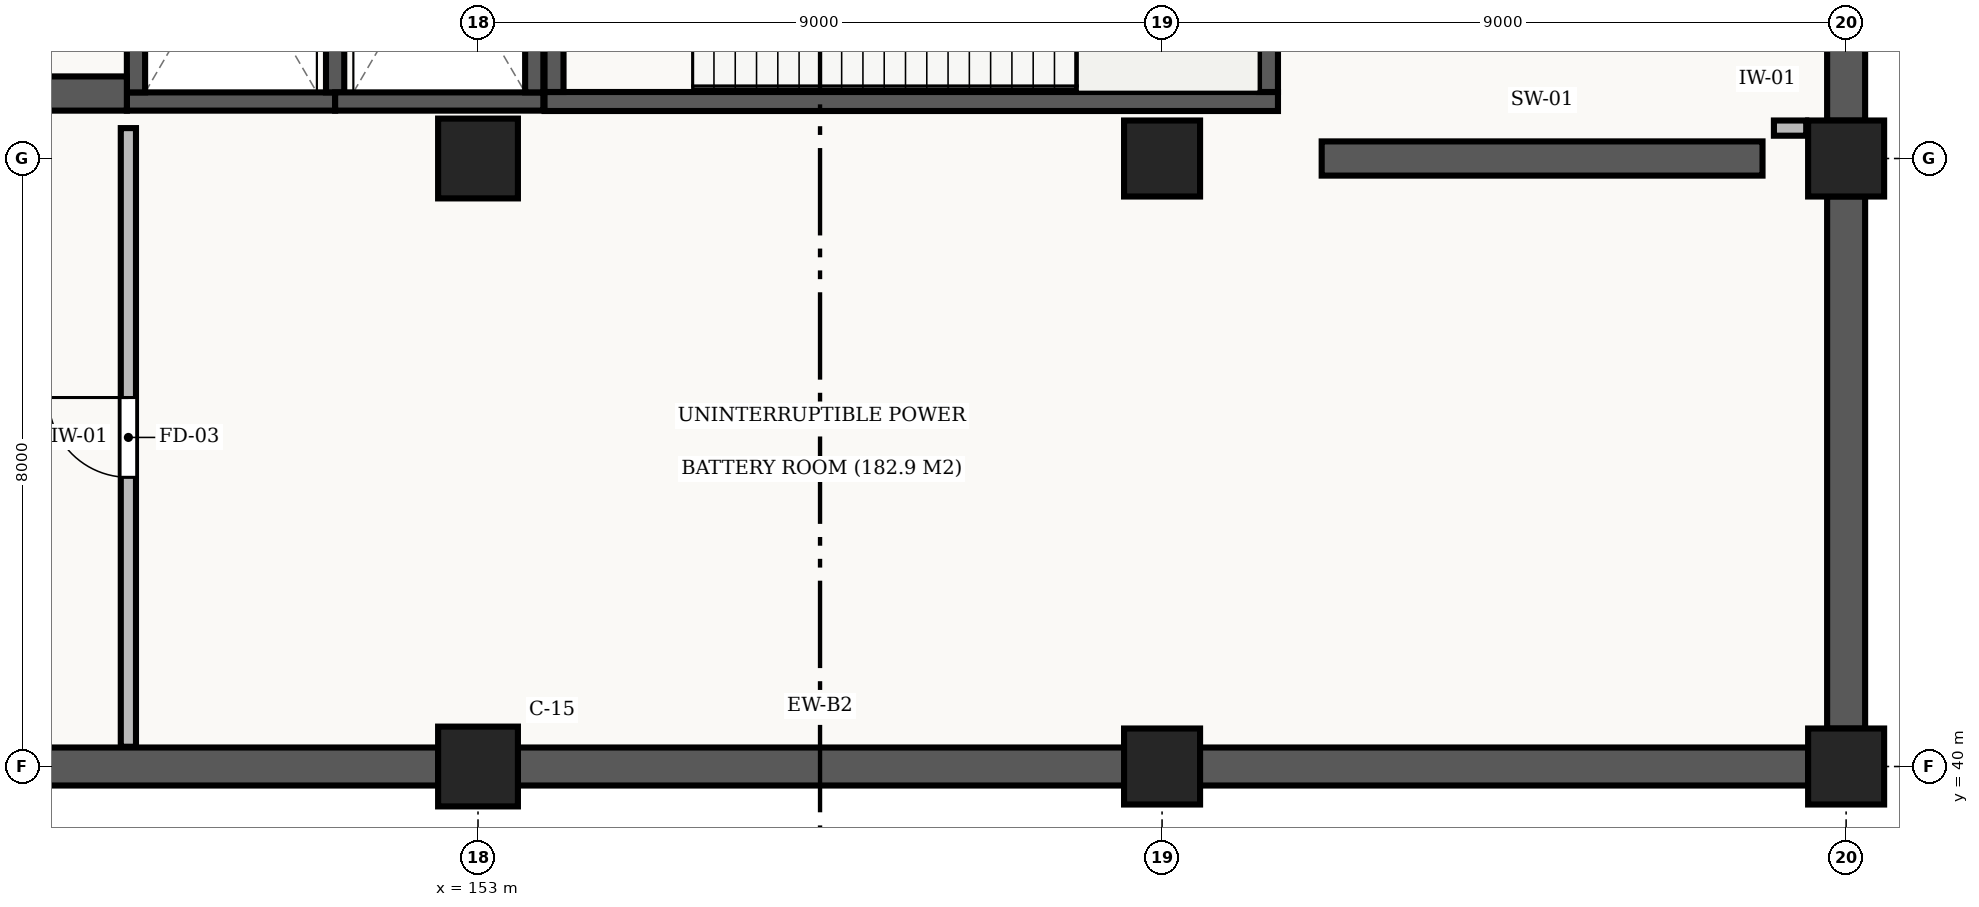
"""IFC4 building model, lengths in metres.
Left out: names, types, materials, properties, quantities, classifications, styles, units other than length and angle.
Written with IfcOpenShell. Run it as: python <this file> out.ifc"""

import sys

from ifc_helpers import new_model, si_unit, direction, frame, frame_2d, origin, origin_2d, place, context, subcontext, project, spatial, rectangle, extrude, element, fill, save


model = new_model("IFC4")
c1 = context("Model", 3, precision=1e-05, world=origin(), true_north=direction((0.0, 1.0)))
c2 = subcontext(c1, "Body", "Model", "MODEL_VIEW")
j1 = project(units=[si_unit("LENGTHUNIT", "METRE"), si_unit("PLANEANGLEUNIT", "RADIAN")], contexts=[c1])
p1 = place(None, origin())
s1 = spatial("IfcSite", under=j1, at=p1, CompositionType="ELEMENT")
p2 = place(p1, origin())
s2 = spatial("IfcBuilding", under=s1, at=p2, CompositionType="ELEMENT")
p3 = place(p2, frame((0.0, 0.0, -6.0)))
s3 = spatial("IfcBuildingStorey", under=s2, at=p3, CompositionType="ELEMENT", Elevation=-6.0)
for number, where, z_axis, x_axis in (
    (1, (153.0, 40.0, 0.0), (0.0, 0.0, 1.0), (1.0, 0.0, 0.0)),
    (2, (153.0, 48.0, 0.0), (0.0, 0.0, 1.0), (1.0, 0.0, 0.0)),
):
    element("IfcColumn", number, at=place(p3, frame(where, z_axis=z_axis, x_axis=x_axis)), inside=s3, PredefinedType="COLUMN", context=c2, shape_type="SweptSolid", body=[
        extrude(rectangle(XDim=1.05, YDim=1.05, at=origin_2d()), origin(), (0.0, 0.0, 1.0), 6.0),
    ])
for number, where, z_axis, x_axis in (
    (3, (162.0, 40.0, 0.0), (0.0, 0.0, 1.0), (1.0, 0.0, 0.0)),
    (4, (162.0, 48.0, 0.0), (0.0, 0.0, 1.0), (1.0, 0.0, 0.0)),
    (5, (171.0, 40.0, 0.0), (0.0, 0.0, 1.0), (1.0, 0.0, 0.0)),
    (6, (171.0, 48.0, 0.0), (0.0, 0.0, 1.0), (1.0, 0.0, 0.0)),
):
    element("IfcColumn", number, at=place(p3, frame(where, z_axis=z_axis, x_axis=x_axis)), inside=s3, PredefinedType="COLUMN", context=c2, shape_type="SweptSolid", body=[
        extrude(rectangle(XDim=1.0, YDim=1.0, at=origin_2d()), origin(), (0.0, 0.0, 1.0), 6.0),
    ])
for number, where, z_axis, x_axis in (
    (7, (171.0, 55.502, 0.0), (0.0, 0.0, 1.0), (0.0, -1.0, 0.0)),
    (8, (171.0, 47.502, 0.0), (0.0, 0.0, 1.0), (0.0, -1.0, 0.0)),
):
    element("IfcWall", number, at=place(p3, frame(where, z_axis=z_axis, x_axis=x_axis)), inside=s3, PredefinedType="STANDARD", context=c2, shape_type="SweptSolid", body=[
        extrude(rectangle(XDim=7.004, YDim=0.5, at=frame_2d((3.502, 0.0))), origin(), (0.0, 0.0, 1.0), 5.56),
    ])
p4 = place(p3, frame((170.502, 40.0, 0.0), z_axis=(0.0, 0.0, 1.0), x_axis=(-1.0, 0.0, 0.0)))
e9 = element("IfcWall", 9, at=p4, inside=s3, PredefinedType="STANDARD", context=c2, shape_type="SweptSolid", body=[
    extrude(rectangle(XDim=8.004, YDim=0.5, at=frame_2d((4.002, 0.0))), origin(), (0.0, 0.0, 1.0), 5.56),
])
for number, where, z_axis, x_axis in (
    (10, (161.502, 40.0, 0.0), (0.0, 0.0, 1.0), (-1.0, 0.0, 0.0)),
    (11, (152.477, 40.0, 0.0), (0.0, 0.0, 1.0), (-1.0, 0.0, 0.0)),
):
    element("IfcWall", number, at=place(p3, frame(where, z_axis=z_axis, x_axis=x_axis)), inside=s3, PredefinedType="STANDARD", context=c2, shape_type="SweptSolid", body=[
        extrude(rectangle(XDim=7.979, YDim=0.5, at=frame_2d((3.99, 0.0))), origin(), (0.0, 0.0, 1.0), 5.56),
    ])
p5 = place(p3, frame((153.875, 48.75, 0.0), z_axis=(0.0, 0.0, 1.0), x_axis=(1.0, 0.0, 0.0)))
e12 = element("IfcWall", 12, at=p5, inside=s3, PredefinedType="SHEAR", context=c2, shape_type="SweptSolid", body=[
    extrude(rectangle(XDim=9.65, YDim=0.25, at=frame_2d((4.825, 0.0))), origin(), (0.0, 0.0, 1.0), 5.55),
])
for number, where, z_axis, x_axis in (
    (13, (154.0, 52.725, 0.0), (0.0, 0.0, 1.0), (0.0, -1.0, 0.0)),
    (14, (163.4, 48.875, 0.0), (0.0, 0.0, 1.0), (0.0, 1.0, 0.0)),
):
    element("IfcWall", number, at=place(p3, frame(where, z_axis=z_axis, x_axis=x_axis)), inside=s3, PredefinedType="SHEAR", context=c2, shape_type="SweptSolid", body=[
        extrude(rectangle(XDim=3.85, YDim=0.25, at=frame_2d((1.925, 0.0))), origin(), (0.0, 0.0, 1.0), 5.55),
    ])
p6 = place(p3, frame((148.38, 48.75, 0.0), z_axis=(0.0, 0.0, 1.0), x_axis=(1.0, 0.0, 0.0)))
e15 = element("IfcWall", 15, at=p6, inside=s3, PredefinedType="SHEAR", context=c2, shape_type="SweptSolid", body=[
    extrude(rectangle(XDim=2.74, YDim=0.24, at=frame_2d((1.37, 0.0))), origin(), (0.0, 0.0, 1.0), 5.55),
])
for number, where, z_axis, x_axis in (
    (16, (148.5, 52.73, 0.0), (0.0, 0.0, 1.0), (0.0, -1.0, 0.0)),
    (17, (151.12, 48.87, 0.0), (0.0, 0.0, 1.0), (0.0, 1.0, 0.0)),
):
    element("IfcWall", number, at=place(p3, frame(where, z_axis=z_axis, x_axis=x_axis)), inside=s3, PredefinedType="SHEAR", context=c2, shape_type="SweptSolid", body=[
        extrude(rectangle(XDim=3.86, YDim=0.24, at=frame_2d((1.93, 0.0))), origin(), (0.0, 0.0, 1.0), 5.55),
    ])
p7 = place(p3, frame((151.12, 48.75, 0.0), z_axis=(0.0, 0.0, 1.0), x_axis=(1.0, 0.0, 0.0)))
e18 = element("IfcWall", 18, at=p7, inside=s3, PredefinedType="SHEAR", context=c2, shape_type="SweptSolid", body=[
    extrude(rectangle(XDim=2.74, YDim=0.24, at=frame_2d((1.37, 0.0))), origin(), (0.0, 0.0, 1.0), 5.55),
])
p8 = place(p3, frame((153.74, 48.87, 0.0), z_axis=(0.0, 0.0, 1.0), x_axis=(0.0, 1.0, 0.0)))
e19 = element("IfcWall", 19, at=p8, inside=s3, PredefinedType="SHEAR", context=c2, shape_type="SweptSolid", body=[
    extrude(rectangle(XDim=3.86, YDim=0.24, at=frame_2d((1.93, 0.0))), origin(), (0.0, 0.0, 1.0), 5.55),
])
p9 = place(p3, frame((145.68, 48.855, 0.0), z_axis=(0.0, 0.0, 1.0), x_axis=(1.0, 0.0, 0.0)))
e20 = element("IfcWall", 20, at=p9, inside=s3, PredefinedType="SHEAR", context=c2, shape_type="SweptSolid", body=[
    extrude(rectangle(XDim=2.7, YDim=0.45, at=frame_2d((1.35, 0.0))), origin(), (0.0, 0.0, 1.0), 4.6),
])
p10 = place(p3, frame((164.1, 48.0, 0.0), z_axis=(0.0, 0.0, 1.0), x_axis=(1.0, 0.0, 0.0)))
e21 = element("IfcWall", 21, at=p10, inside=s3, PredefinedType="SHEAR", context=c2, shape_type="SweptSolid", body=[
    extrude(rectangle(XDim=5.8, YDim=0.45, at=frame_2d((2.9, 0.0))), origin(), (0.0, 0.0, 1.0), 4.6),
])
p11 = place(p3, frame((170.05, 48.4, 0.0), z_axis=(0.0, 0.0, 1.0), x_axis=(1.0, 0.0, 0.0)))
e22 = element("IfcWall", 22, at=p11, inside=s3, PredefinedType="STANDARD", context=c2, shape_type="SweptSolid", body=[
    extrude(rectangle(XDim=0.425, YDim=0.2, at=frame_2d((0.212, 0.0))), origin(), (0.0, 0.0, 1.0), 5.55),
])
p12 = place(p3, frame((148.4, 40.26, 0.0), z_axis=(0.0, 0.0, 1.0), x_axis=(0.0, 1.0, 0.0)))
e23 = element("IfcWall", 23, at=p12, inside=s3, PredefinedType="STANDARD", context=c2, shape_type="SweptSolid", body=[
    extrude(rectangle(XDim=8.14, YDim=0.2, at=frame_2d((4.07, 0.0))), origin(), (0.0, 0.0, 1.0), 5.55),
])
p13 = place(p12, frame((3.545, 0.0, 0.0)))
e24 = element("IfcOpeningElement", 24, at=p13, cuts=e23, PredefinedType="OPENING", context=c2, shape_type="SweptSolid", body=[
    extrude(rectangle(XDim=1.05, YDim=2.15, at=frame_2d((0.525, 1.075))), frame((0.0, 0.112, 0.0), z_axis=(0.0, -1.0, 0.0), x_axis=(1.0, 0.0, 0.0)), (0.0, 0.0, 1.0), 0.224),
])
p14 = place(p13, origin())
e25 = element("IfcDoor", 25, at=p14, inside=s3, OperationType="SINGLE_SWING_RIGHT", PredefinedType="DOOR", context=c2, shape_type="SweptSolid", body=[
    extrude(rectangle(XDim=1.05, YDim=2.15, at=frame_2d((0.525, 1.075))), frame((0.0, 0.025, 0.0), z_axis=(0.0, -1.0, 0.0), x_axis=(1.0, 0.0, 0.0)), (0.0, 0.0, 1.0), 0.05),
])
fill(e24, e25)
save(model, sys.argv[1])
